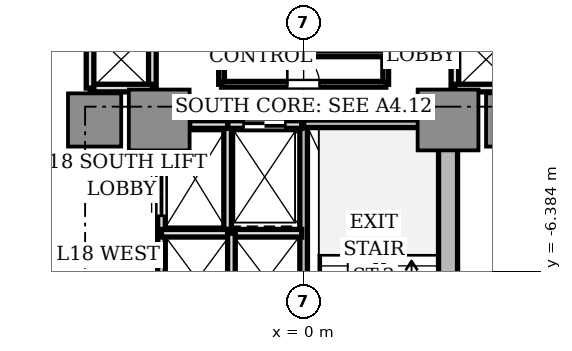
"""IFC4 building model, lengths in metres.
Left out: names, types, materials, properties, quantities, classifications, styles, units other than length and angle.
Written with IfcOpenShell. Run it as: python <this file> out.ifc"""

import sys

from ifc_helpers import new_model, si_unit, direction, frame, frame_2d, origin, origin_2d, place, context, subcontext, project, spatial, rectangle, extrude, source, transform, mapped, element, fill, save


model = new_model("IFC4")
c1 = context("Model", 3, precision=1e-05, world=origin(), true_north=direction((0.0, 1.0)))
c2 = subcontext(c1, "Body", "Model", "MODEL_VIEW")
j1 = project(units=[si_unit("LENGTHUNIT", "METRE"), si_unit("PLANEANGLEUNIT", "RADIAN")], contexts=[c1])
p1 = place(None, origin())
s1 = spatial("IfcSite", under=j1, at=p1, CompositionType="ELEMENT")
p2 = place(p1, origin())
s2 = spatial("IfcBuilding", under=s1, at=p2, CompositionType="ELEMENT")
p3 = place(p2, frame((0.0, 0.0, 67.8)))
s3 = spatial("IfcBuildingStorey", under=s2, at=p3, CompositionType="ELEMENT", Elevation=67.8)
p4 = place(p3, frame((3.8, -9.75, 0.0), z_axis=(0.0, 0.0, 1.0), x_axis=(0.0, 1.0, 0.0)))
e1 = element("IfcWall", 1, at=p4, inside=s3, PredefinedType="SHEAR", context=c2, shape_type="SweptSolid", body=[
    extrude(rectangle(XDim=6.9, YDim=0.5, at=frame_2d((3.45, 0.0))), origin(), (0.0, 0.0, 1.0), 3.11),
])
m1 = source(origin(), c2, "Body", "SweptSolid", [
    extrude(rectangle(XDim=1.6, YDim=1.6, at=origin_2d()), origin(), (0.0, 0.0, 1.0), 3.11),
])
for number, where, z_axis, x_axis in (
    (2, (-3.8, -2.4, 0.0), (0.0, 0.0, 1.0), (1.0, 0.0, 0.0)),
    (3, (3.8, -2.4, 0.0), (0.0, 0.0, 1.0), (1.0, 0.0, 0.0)),
):
    element("IfcColumn", number, at=place(p3, frame(where, z_axis=z_axis, x_axis=x_axis)), inside=s3, PredefinedType="COLUMN", context=c2, shape_type="MappedRepresentation", body=[
        mapped(m1, transform((0.0, 0.0, 0.0), scale=1.0)),
    ])
m2 = source(origin(), c2, "Body", "SweptSolid", [
    extrude(rectangle(XDim=1.4, YDim=1.4, at=origin_2d()), origin(), (0.0, 0.0, 1.0), 3.11),
])
for number, where, z_axis, x_axis in (
    (4, (5.5, -2.4, 0.0), (0.0, 0.0, 1.0), (1.0, 0.0, 0.0)),
    (5, (-5.5, -2.4, 0.0), (0.0, 0.0, 1.0), (1.0, 0.0, 0.0)),
):
    element("IfcColumn", number, at=place(p3, frame(where, z_axis=z_axis, x_axis=x_axis)), inside=s3, PredefinedType="COLUMN", context=c2, shape_type="MappedRepresentation", body=[
        mapped(m2, transform((0.0, 0.0, 0.0), scale=1.0)),
    ])
p5 = place(p3, frame((0.0, -10.18, 0.0), z_axis=(0.0, 0.0, 1.0), x_axis=(0.0, 1.0, 0.0)))
e6 = element("IfcWall", 6, at=p5, inside=s3, PredefinedType="SOLIDWALL", context=c2, shape_type="SweptSolid", body=[
    extrude(rectangle(XDim=7.68, YDim=0.2, at=frame_2d((3.84, 0.0))), origin(), (0.0, 0.0, 1.0), 3.11),
])
p6 = place(p5, frame((0.28, 0.0, 0.0)))
e7 = element("IfcOpeningElement", 7, at=p6, cuts=e6, PredefinedType="OPENING", context=c2, shape_type="SweptSolid", body=[
    extrude(rectangle(XDim=1.1, YDim=2.15, at=frame_2d((0.55, 1.075))), frame((0.0, 0.11, 0.0), z_axis=(0.0, -1.0, 0.0), x_axis=(1.0, 0.0, 0.0)), (0.0, 0.0, 1.0), 0.22),
])
p7 = place(p3, frame((0.0, -2.5, 0.0), z_axis=(0.0, 0.0, 1.0), x_axis=(1.0, 0.0, 0.0)))
e8 = element("IfcWall", 8, at=p7, inside=s3, PredefinedType="SOLIDWALL", context=c2, shape_type="SweptSolid", body=[
    extrude(rectangle(XDim=3.72, YDim=0.2, at=frame_2d((1.86, 0.0))), origin(), (0.0, 0.0, 1.0), 3.11),
])
p8 = place(p3, frame((-2.0, -5.28, 0.0), z_axis=(0.0, 0.0, 1.0), x_axis=(0.0, 1.0, 0.0)))
e9 = element("IfcWall", 9, at=p8, inside=s3, PredefinedType="SOLIDWALL", context=c2, shape_type="SweptSolid", body=[
    extrude(rectangle(XDim=2.78, YDim=0.2, at=frame_2d((1.39, 0.0))), origin(), (0.0, 0.0, 1.0), 2.66),
])
p9 = place(p3, frame((-2.0, -2.52, 0.0), z_axis=(0.0, 0.0, 1.0), x_axis=(1.0, 0.0, 0.0)))
e10 = element("IfcWall", 10, at=p9, inside=s3, PredefinedType="SOLIDWALL", context=c2, shape_type="SweptSolid", body=[
    extrude(rectangle(XDim=1.95, YDim=0.2, at=frame_2d((0.975, 0.0))), origin(), (0.0, 0.0, 1.0), 2.66),
])
p10 = place(p9, frame((0.42, 0.0, 0.0)))
e11 = element("IfcOpeningElement", 11, at=p10, cuts=e10, PredefinedType="OPENING", context=c2, shape_type="SweptSolid", body=[
    extrude(rectangle(XDim=1.1, YDim=2.2, at=frame_2d((0.55, 1.1))), frame((0.0, 0.11, 0.0), z_axis=(0.0, -1.0, 0.0), x_axis=(1.0, 0.0, 0.0)), (0.0, 0.0, 1.0), 0.22),
])
p11 = place(p3, frame((-3.0, -2.52, 0.0), z_axis=(0.0, 0.0, 1.0), x_axis=(1.0, 0.0, 0.0)))
e12 = element("IfcWall", 12, at=p11, inside=s3, PredefinedType="SOLIDWALL", context=c2, shape_type="SweptSolid", body=[
    extrude(rectangle(XDim=1.0, YDim=0.2, at=frame_2d((0.5, 0.0))), origin(), (0.0, 0.0, 1.0), 2.66),
])
p12 = place(p3, frame((-3.74, -5.36, 0.0), z_axis=(0.0, 0.0, 1.0), x_axis=(0.0, 1.0, 0.0)))
e13 = element("IfcWall", 13, at=p12, inside=s3, PredefinedType="SOLIDWALL", context=c2, shape_type="SweptSolid", body=[
    extrude(rectangle(XDim=2.08, YDim=0.2, at=frame_2d((1.04, 0.0))), origin(), (0.0, 0.0, 1.0), 2.66),
])
p13 = place(p12, frame((0.44, 0.0, 0.0)))
e14 = element("IfcOpeningElement", 14, at=p13, cuts=e13, PredefinedType="OPENING", context=c2, shape_type="SweptSolid", body=[
    extrude(rectangle(XDim=1.2, YDim=2.2, at=frame_2d((0.6, 1.1))), frame((0.0, 0.11, 0.0), z_axis=(0.0, -1.0, 0.0), x_axis=(1.0, 0.0, 0.0)), (0.0, 0.0, 1.0), 0.22),
])
p14 = place(p3, frame((-3.74, -7.86, 0.0), z_axis=(0.0, 0.0, 1.0), x_axis=(0.0, 1.0, 0.0)))
e15 = element("IfcWall", 15, at=p14, inside=s3, PredefinedType="SOLIDWALL", context=c2, shape_type="SweptSolid", body=[
    extrude(rectangle(XDim=2.48, YDim=0.2, at=frame_2d((1.24, 0.0))), origin(), (0.0, 0.0, 1.0), 2.66),
])
p15 = place(p3, frame((-3.74, -5.38, 0.0), z_axis=(0.0, 0.0, 1.0), x_axis=(1.0, 0.0, 0.0)))
e16 = element("IfcWall", 16, at=p15, inside=s3, PredefinedType="SOLIDWALL", context=c2, shape_type="SweptSolid", body=[
    extrude(rectangle(XDim=3.69, YDim=0.2, at=frame_2d((1.845, 0.0))), origin(), (0.0, 0.0, 1.0), 2.66),
])
p16 = place(p3, frame((-1.9, -7.86, 0.0), z_axis=(0.0, 0.0, 1.0), x_axis=(0.0, 1.0, 0.0)))
e17 = element("IfcWall", 17, at=p16, inside=s3, PredefinedType="SOLIDWALL", context=c2, shape_type="SweptSolid", body=[
    extrude(rectangle(XDim=2.48, YDim=0.2, at=frame_2d((1.24, 0.0))), origin(), (0.0, 0.0, 1.0), 2.66),
])
p17 = place(p3, frame((3.98, -1.56, 0.0), z_axis=(0.0, 0.0, 1.0), x_axis=(0.0, 1.0, 0.0)))
e18 = element("IfcWall", 18, at=p17, inside=s3, PredefinedType="SOLIDWALL", context=c2, shape_type="SweptSolid", body=[
    extrude(rectangle(XDim=3.12, YDim=0.2, at=frame_2d((1.56, 0.0))), origin(), (0.0, 0.0, 1.0), 2.18),
])
p18 = place(p3, frame((3.98, -1.56, 0.0), z_axis=(0.0, 0.0, 1.0), x_axis=(1.0, 0.0, 0.0)))
e19 = element("IfcWall", 19, at=p18, inside=s3, PredefinedType="SOLIDWALL", context=c2, shape_type="SweptSolid", body=[
    extrude(rectangle(XDim=1.64, YDim=0.2, at=frame_2d((0.82, 0.0))), origin(), (0.0, 0.0, 1.0), 2.66),
])
p19 = place(p3, frame((-3.98, -1.56, 0.0), z_axis=(0.0, 0.0, 1.0), x_axis=(0.0, 1.0, 0.0)))
e20 = element("IfcWall", 20, at=p19, inside=s3, PredefinedType="SOLIDWALL", context=c2, shape_type="SweptSolid", body=[
    extrude(rectangle(XDim=3.12, YDim=0.2, at=frame_2d((1.56, 0.0))), origin(), (0.0, 0.0, 1.0), 2.18),
])
p20 = place(p3, frame((-5.62, -1.56, 0.0), z_axis=(0.0, 0.0, 1.0), x_axis=(1.0, 0.0, 0.0)))
e21 = element("IfcWall", 21, at=p20, inside=s3, PredefinedType="SOLIDWALL", context=c2, shape_type="SweptSolid", body=[
    extrude(rectangle(XDim=1.64, YDim=0.2, at=frame_2d((0.82, 0.0))), origin(), (0.0, 0.0, 1.0), 2.66),
])
p21 = place(p3, frame((-5.62, -1.56, 0.0), z_axis=(0.0, 0.0, 1.0), x_axis=(0.0, 1.0, 0.0)))
e22 = element("IfcWall", 22, at=p21, inside=s3, PredefinedType="SOLIDWALL", context=c2, shape_type="SweptSolid", body=[
    extrude(rectangle(XDim=1.56, YDim=0.2, at=frame_2d((0.78, 0.0))), origin(), (0.0, 0.0, 1.0), 2.66),
])
p22 = place(p3, frame((2.16, -1.46, 0.0), z_axis=(0.0, 0.0, 1.0), x_axis=(0.0, 1.0, 0.0)))
e23 = element("IfcWall", 23, at=p22, inside=s3, PredefinedType="PARTITIONING", context=c2, shape_type="SweptSolid", body=[
    extrude(rectangle(XDim=2.92, YDim=0.15, at=frame_2d((1.46, 0.0))), origin(), (0.0, 0.0, 1.0), 2.66),
])
p23 = place(p22, frame((1.035, 0.0, 0.0)))
e24 = element("IfcOpeningElement", 24, at=p23, cuts=e23, PredefinedType="OPENING", context=c2, shape_type="SweptSolid", body=[
    extrude(rectangle(XDim=0.85, YDim=2.1, at=frame_2d((0.425, 1.05))), frame((0.0, 0.085, 0.0), z_axis=(0.0, -1.0, 0.0), x_axis=(1.0, 0.0, 0.0)), (0.0, 0.0, 1.0), 0.17),
])
p24 = place(p3, frame((-2.16, -1.46, 0.0), z_axis=(0.0, 0.0, 1.0), x_axis=(0.0, 1.0, 0.0)))
e25 = element("IfcWall", 25, at=p24, inside=s3, PredefinedType="PARTITIONING", context=c2, shape_type="SweptSolid", body=[
    extrude(rectangle(XDim=2.92, YDim=0.15, at=frame_2d((1.46, 0.0))), origin(), (0.0, 0.0, 1.0), 2.66),
])
p25 = place(p3, frame((-2.16, -1.46, 0.0), z_axis=(0.0, 0.0, 1.0), x_axis=(1.0, 0.0, 0.0)))
e26 = element("IfcWall", 26, at=p25, inside=s3, PredefinedType="PARTITIONING", context=c2, shape_type="SweptSolid", body=[
    extrude(rectangle(XDim=4.32, YDim=0.15, at=frame_2d((2.16, 0.0))), origin(), (0.0, 0.0, 1.0), 2.66),
])
p26 = place(p25, frame((1.73, 0.0, 0.0)))
e27 = element("IfcOpeningElement", 27, at=p26, cuts=e26, PredefinedType="OPENING", context=c2, shape_type="SweptSolid", body=[
    extrude(rectangle(XDim=0.85, YDim=2.1, at=frame_2d((0.425, 1.05))), frame((0.0, 0.085, 0.0), z_axis=(0.0, -1.0, 0.0), x_axis=(1.0, 0.0, 0.0)), (0.0, 0.0, 1.0), 0.17),
])
p27 = place(p3, frame((-2.16, -0.66, 0.0), z_axis=(0.0, 0.0, 1.0), x_axis=(1.0, 0.0, 0.0)))
e28 = element("IfcWall", 28, at=p27, inside=s3, PredefinedType="PARTITIONING", context=c2, shape_type="SweptSolid", body=[
    extrude(rectangle(XDim=4.32, YDim=0.15, at=frame_2d((2.16, 0.0))), origin(), (0.0, 0.0, 1.0), 2.66),
])
m3 = source(origin(), c2, "Body", "SweptSolid", [
    extrude(rectangle(XDim=1.1, YDim=0.05, at=origin_2d()), origin(), (0.0, 0.0, 1.0), 2.2),
])
p28 = place(p10, frame((0.55, 0.0, 0.0)))
e29 = element("IfcDoor", 29, at=p28, inside=s3, OperationType="DOUBLE_DOOR_SLIDING", PredefinedType="DOOR", context=c2, shape_type="MappedRepresentation", body=[
    mapped(m3, transform((0.0, 0.0, 0.0), scale=1.0)),
])
fill(e11, e29)
m4 = source(origin(), c2, "Body", "SweptSolid", [
    extrude(rectangle(XDim=1.2, YDim=0.05, at=origin_2d()), origin(), (0.0, 0.0, 1.0), 2.2),
])
p29 = place(p13, frame((0.6, 0.0, 0.0)))
e30 = element("IfcDoor", 30, at=p29, inside=s3, OperationType="DOUBLE_DOOR_SLIDING", PredefinedType="DOOR", context=c2, shape_type="MappedRepresentation", body=[
    mapped(m4, transform((0.0, 0.0, 0.0), scale=1.0)),
])
fill(e14, e30)
m5 = source(origin(), c2, "Body", "SweptSolid", [
    extrude(rectangle(XDim=0.85, YDim=0.05, at=origin_2d()), origin(), (0.0, 0.0, 1.0), 2.1),
])
p30 = place(p26, frame((0.425, 0.0, 0.0)))
e31 = element("IfcDoor", 31, at=p30, inside=s3, OperationType="SINGLE_SWING_LEFT", PredefinedType="DOOR", context=c2, shape_type="MappedRepresentation", body=[
    mapped(m5, transform((0.0, 0.0, 0.0), scale=1.0)),
])
fill(e27, e31)
save(model, sys.argv[1])
